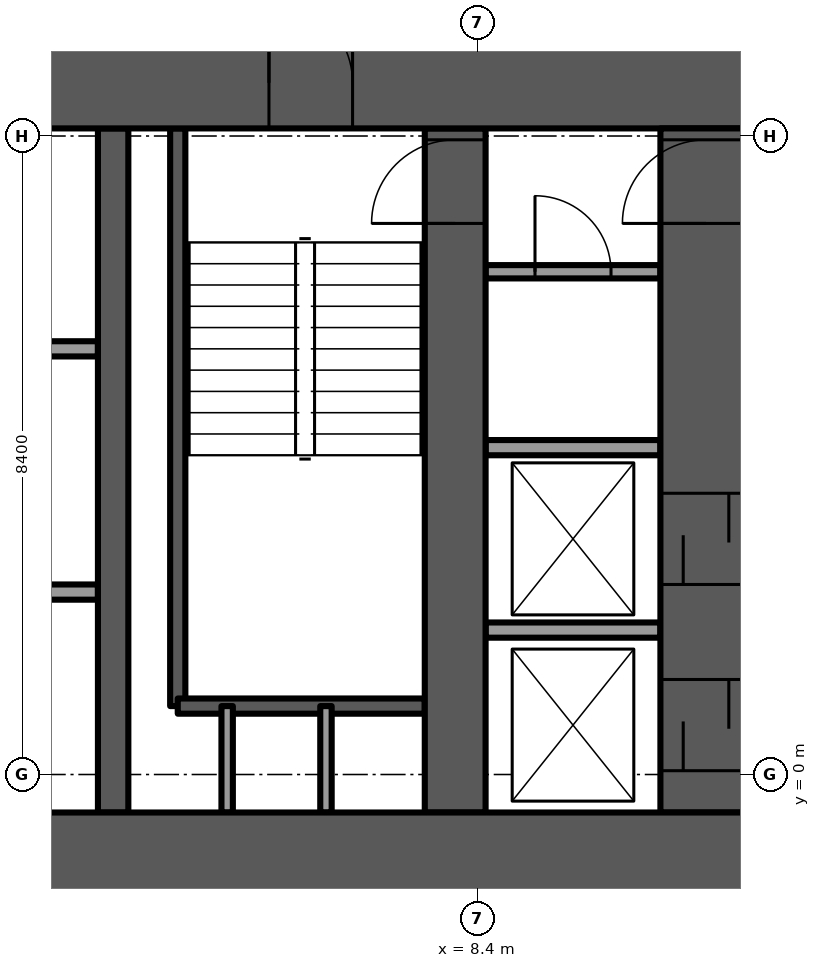
"""IFC4 building model, lengths in metres.
Left out: names, types, materials, properties, quantities, classifications, styles, units other than length and angle.
Written with IfcOpenShell. Run it as: python <this file> out.ifc"""

import sys

from ifc_helpers import new_model, si_unit, direction, frame, frame_2d, origin, place, context, subcontext, project, spatial, rectangle, extrude, element, fill, save


model = new_model("IFC4")
c1 = context("Model", 3, precision=1e-05, world=origin(), true_north=direction((0.0, 1.0)))
c2 = subcontext(c1, "Body", "Model", "MODEL_VIEW")
j1 = project(units=[si_unit("LENGTHUNIT", "METRE"), si_unit("PLANEANGLEUNIT", "RADIAN")], contexts=[c1])
p1 = place(None, origin())
s1 = spatial("IfcSite", under=j1, at=p1, CompositionType="ELEMENT")
p2 = place(p1, origin())
s2 = spatial("IfcBuilding", under=s1, at=p2, CompositionType="ELEMENT")
p3 = place(p2, frame((0.0, 0.0, 39.25)))
s3 = spatial("IfcBuildingStorey", under=s2, at=p3, CompositionType="ELEMENT", Elevation=39.25)
p4 = place(p3, frame((-12.0, -1.1, -0.3), z_axis=(0.0, 0.0, 1.0), x_axis=(1.0, 0.0, 0.0)))
e1 = element("IfcWall", 1, at=p4, inside=s3, PredefinedType="SHEAR", context=c2, shape_type="SweptSolid", body=[
    extrude(rectangle(XDim=24.0, YDim=1.2, at=frame_2d((12.0, 0.0))), origin(), (0.0, 0.0, 1.0), 3.75),
])
p5 = place(p4, frame((11.2, 0.0, 0.0)))
e2 = element("IfcOpeningElement", 2, at=p5, cuts=e1, PredefinedType="OPENING", context=c2, shape_type="SweptSolid", body=[
    extrude(rectangle(XDim=1.6, YDim=2.1, at=frame_2d((0.8, 1.05))), frame((0.0, 0.6, 0.0), z_axis=(0.0, -1.0, 0.0), x_axis=(1.0, 0.0, 0.0)), (0.0, 0.0, 1.0), 1.2),
])
p6 = place(p3, frame((-12.0, 9.1, -0.3), z_axis=(0.0, 0.0, 1.0), x_axis=(1.0, 0.0, 0.0)))
e3 = element("IfcWall", 3, at=p6, inside=s3, PredefinedType="SHEAR", context=c2, shape_type="SweptSolid", body=[
    extrude(rectangle(XDim=24.0, YDim=1.2, at=frame_2d((12.0, 0.0))), origin(), (0.0, 0.0, 1.0), 3.75),
])
p7 = place(p6, frame((11.2, 0.0, 0.0)))
e4 = element("IfcOpeningElement", 4, at=p7, cuts=e3, PredefinedType="OPENING", context=c2, shape_type="SweptSolid", body=[
    extrude(rectangle(XDim=1.6, YDim=2.1, at=frame_2d((0.8, 1.05))), frame((0.0, 0.6, 0.0), z_axis=(0.0, -1.0, 0.0), x_axis=(1.0, 0.0, 0.0)), (0.0, 0.0, 1.0), 1.2),
])
p8 = place(p6, frame((5.25, 0.0, 0.0)))
e5 = element("IfcOpeningElement", 5, at=p8, cuts=e3, PredefinedType="OPENING", context=c2, shape_type="SweptSolid", body=[
    extrude(rectangle(XDim=1.1, YDim=2.1, at=frame_2d((0.55, 1.05))), frame((0.0, 0.6, 0.0), z_axis=(0.0, -1.0, 0.0), x_axis=(1.0, 0.0, 0.0)), (0.0, 0.0, 1.0), 1.2),
])
p9 = place(p6, frame((17.65, 0.0, 0.0)))
e6 = element("IfcOpeningElement", 6, at=p9, cuts=e3, PredefinedType="OPENING", context=c2, shape_type="SweptSolid", body=[
    extrude(rectangle(XDim=1.1, YDim=2.1, at=frame_2d((0.55, 1.05))), frame((0.0, 0.6, 0.0), z_axis=(0.0, -1.0, 0.0), x_axis=(1.0, 0.0, 0.0)), (0.0, 0.0, 1.0), 1.2),
])
p10 = place(p3, frame((8.1, -0.5, -0.3), z_axis=(0.0, 0.0, 1.0), x_axis=(0.0, 1.0, 0.0)))
e7 = element("IfcWall", 7, at=p10, inside=s3, PredefinedType="SHEAR", context=c2, shape_type="SweptSolid", body=[
    extrude(rectangle(XDim=9.0, YDim=0.8, at=frame_2d((4.5, 0.0))), origin(), (0.0, 0.0, 1.0), 3.75),
])
p11 = place(p10, frame((7.75, 0.0, 0.0)))
e8 = element("IfcOpeningElement", 8, at=p11, cuts=e7, PredefinedType="OPENING", context=c2, shape_type="SweptSolid", body=[
    extrude(rectangle(XDim=1.1, YDim=2.1, at=frame_2d((0.55, 1.05))), frame((0.0, 0.4, 0.0), z_axis=(0.0, -1.0, 0.0), x_axis=(1.0, 0.0, 0.0)), (0.0, 0.0, 1.0), 0.8),
])
p12 = place(p3, frame((3.6, -0.5, -0.3), z_axis=(0.0, 0.0, 1.0), x_axis=(0.0, 1.0, 0.0)))
e9 = element("IfcWall", 9, at=p12, inside=s3, PredefinedType="SHEAR", context=c2, shape_type="SweptSolid", body=[
    extrude(rectangle(XDim=9.0, YDim=0.4, at=frame_2d((4.5, 0.0))), origin(), (0.0, 0.0, 1.0), 3.75),
])
p13 = place(p3, frame((11.4, -0.5, -0.3), z_axis=(0.0, 0.0, 1.0), x_axis=(0.0, 1.0, 0.0)))
e10 = element("IfcWall", 10, at=p13, inside=s3, PredefinedType="SHEAR", context=c2, shape_type="SweptSolid", body=[
    extrude(rectangle(XDim=9.0, YDim=1.2, at=frame_2d((4.5, 0.0))), origin(), (0.0, 0.0, 1.0), 3.75),
])
p14 = place(p13, frame((7.75, 0.0, 0.0)))
e11 = element("IfcOpeningElement", 11, at=p14, cuts=e10, PredefinedType="OPENING", context=c2, shape_type="SweptSolid", body=[
    extrude(rectangle(XDim=1.1, YDim=2.1, at=frame_2d((0.55, 1.05))), frame((0.0, 0.6, 0.0), z_axis=(0.0, -1.0, 0.0), x_axis=(1.0, 0.0, 0.0)), (0.0, 0.0, 1.0), 1.2),
])
p15 = place(p13, frame((0.55, 0.0, 0.0)))
e12 = element("IfcOpeningElement", 12, at=p15, cuts=e10, PredefinedType="OPENING", context=c2, shape_type="SweptSolid", body=[
    extrude(rectangle(XDim=1.2, YDim=2.1, at=frame_2d((0.6, 1.05))), frame((0.0, 0.6, 0.0), z_axis=(0.0, -1.0, 0.0), x_axis=(1.0, 0.0, 0.0)), (0.0, 0.0, 1.0), 1.2),
])
p16 = place(p13, frame((3.0, 0.0, 0.0)))
e13 = element("IfcOpeningElement", 13, at=p16, cuts=e10, PredefinedType="OPENING", context=c2, shape_type="SweptSolid", body=[
    extrude(rectangle(XDim=1.2, YDim=2.1, at=frame_2d((0.6, 1.05))), frame((0.0, 0.6, 0.0), z_axis=(0.0, -1.0, 0.0), x_axis=(1.0, 0.0, 0.0)), (0.0, 0.0, 1.0), 1.2),
])
p17 = place(p3, frame((11.087, -17.647, 0.0), z_axis=(0.0, 0.0, 1.0), x_axis=(0.499999841607, 0.866025495233, 0.0)))
e14 = element("IfcWall", 14, at=p17, inside=s3, PredefinedType="SOLIDWALL", context=c2, shape_type="SweptSolid", body=[
    extrude(rectangle(XDim=19.479, YDim=0.15, at=frame_2d((9.739, 0.0))), origin(), (0.0, 0.0, 1.0), 3.45),
])
p18 = place(p17, frame((1.639, 0.0, 0.15)))
e15 = element("IfcOpeningElement", 15, at=p18, cuts=e14, PredefinedType="OPENING", context=c2, shape_type="SweptSolid", body=[
    extrude(rectangle(XDim=1.8, YDim=2.85, at=frame_2d((0.9, 1.425))), frame((0.0, 0.075, 0.0), z_axis=(0.0, -1.0, 0.0), x_axis=(1.0, 0.0, 0.0)), (0.0, 0.0, 1.0), 0.15),
])
p19 = place(p17, frame((3.739, 0.0, 0.0)))
e16 = element("IfcOpeningElement", 16, at=p19, cuts=e14, PredefinedType="OPENING", context=c2, shape_type="SweptSolid", body=[
    extrude(rectangle(XDim=1.5, YDim=2.4, at=frame_2d((0.75, 1.2))), frame((0.0, 0.075, 0.0), z_axis=(0.0, -1.0, 0.0), x_axis=(1.0, 0.0, 0.0)), (0.0, 0.0, 1.0), 0.15),
])
p20 = place(p17, frame((5.839, 0.0, 0.15)))
e17 = element("IfcOpeningElement", 17, at=p20, cuts=e14, PredefinedType="OPENING", context=c2, shape_type="SweptSolid", body=[
    extrude(rectangle(XDim=1.8, YDim=2.85, at=frame_2d((0.9, 1.425))), frame((0.0, 0.075, 0.0), z_axis=(0.0, -1.0, 0.0), x_axis=(1.0, 0.0, 0.0)), (0.0, 0.0, 1.0), 0.15),
])
p21 = place(p17, frame((7.939, 0.0, 0.0)))
e18 = element("IfcOpeningElement", 18, at=p21, cuts=e14, PredefinedType="OPENING", context=c2, shape_type="SweptSolid", body=[
    extrude(rectangle(XDim=1.5, YDim=2.4, at=frame_2d((0.75, 1.2))), frame((0.0, 0.075, 0.0), z_axis=(0.0, -1.0, 0.0), x_axis=(1.0, 0.0, 0.0)), (0.0, 0.0, 1.0), 0.15),
])
p22 = place(p17, frame((10.039, 0.0, 0.15)))
e19 = element("IfcOpeningElement", 19, at=p22, cuts=e14, PredefinedType="OPENING", context=c2, shape_type="SweptSolid", body=[
    extrude(rectangle(XDim=1.8, YDim=2.85, at=frame_2d((0.9, 1.425))), frame((0.0, 0.075, 0.0), z_axis=(0.0, -1.0, 0.0), x_axis=(1.0, 0.0, 0.0)), (0.0, 0.0, 1.0), 0.15),
])
p23 = place(p17, frame((12.139, 0.0, 0.0)))
e20 = element("IfcOpeningElement", 20, at=p23, cuts=e14, PredefinedType="OPENING", context=c2, shape_type="SweptSolid", body=[
    extrude(rectangle(XDim=1.5, YDim=2.4, at=frame_2d((0.75, 1.2))), frame((0.0, 0.075, 0.0), z_axis=(0.0, -1.0, 0.0), x_axis=(1.0, 0.0, 0.0)), (0.0, 0.0, 1.0), 0.15),
])
p24 = place(p17, frame((14.239, 0.0, 0.15)))
e21 = element("IfcOpeningElement", 21, at=p24, cuts=e14, PredefinedType="OPENING", context=c2, shape_type="SweptSolid", body=[
    extrude(rectangle(XDim=0.9, YDim=2.85, at=frame_2d((0.45, 1.425))), frame((0.0, 0.075, 0.0), z_axis=(0.0, -1.0, 0.0), x_axis=(1.0, 0.0, 0.0)), (0.0, 0.0, 1.0), 0.15),
])
p25 = place(p3, frame((20.826, 0.287, 0.0), z_axis=(0.0, 0.0, 1.0), x_axis=(-0.500006057782, 0.866021906294, 0.0)))
e22 = element("IfcWall", 22, at=p25, inside=s3, PredefinedType="SOLIDWALL", context=c2, shape_type="SweptSolid", body=[
    extrude(rectangle(XDim=23.1, YDim=0.15, at=frame_2d((11.55, 0.0))), origin(), (0.0, 0.0, 1.0), 3.45),
])
p26 = place(p25, frame((4.165, 0.0, 0.15)))
e23 = element("IfcOpeningElement", 23, at=p26, cuts=e22, PredefinedType="OPENING", context=c2, shape_type="SweptSolid", body=[
    extrude(rectangle(XDim=0.9, YDim=2.85, at=frame_2d((0.45, 1.425))), frame((0.0, 0.075, 0.0), z_axis=(0.0, -1.0, 0.0), x_axis=(1.0, 0.0, 0.0)), (0.0, 0.0, 1.0), 0.15),
])
p27 = place(p25, frame((5.645, 0.0, 0.15)))
e24 = element("IfcOpeningElement", 24, at=p27, cuts=e22, PredefinedType="OPENING", context=c2, shape_type="SweptSolid", body=[
    extrude(rectangle(XDim=1.5, YDim=2.85, at=frame_2d((0.75, 1.425))), frame((0.0, 0.075, 0.0), z_axis=(0.0, -1.0, 0.0), x_axis=(1.0, 0.0, 0.0)), (0.0, 0.0, 1.0), 0.15),
])
p28 = place(p25, frame((8.365, 0.0, 0.15)))
e25 = element("IfcOpeningElement", 25, at=p28, cuts=e22, PredefinedType="OPENING", context=c2, shape_type="SweptSolid", body=[
    extrude(rectangle(XDim=1.8, YDim=2.85, at=frame_2d((0.9, 1.425))), frame((0.0, 0.075, 0.0), z_axis=(0.0, -1.0, 0.0), x_axis=(1.0, 0.0, 0.0)), (0.0, 0.0, 1.0), 0.15),
])
p29 = place(p25, frame((10.465, 0.0, 0.15)))
e26 = element("IfcOpeningElement", 26, at=p29, cuts=e22, PredefinedType="OPENING", context=c2, shape_type="SweptSolid", body=[
    extrude(rectangle(XDim=1.5, YDim=2.85, at=frame_2d((0.75, 1.425))), frame((0.0, 0.075, 0.0), z_axis=(0.0, -1.0, 0.0), x_axis=(1.0, 0.0, 0.0)), (0.0, 0.0, 1.0), 0.15),
])
p30 = place(p25, frame((12.564, 0.0, 0.15)))
e27 = element("IfcOpeningElement", 27, at=p30, cuts=e22, PredefinedType="OPENING", context=c2, shape_type="SweptSolid", body=[
    extrude(rectangle(XDim=0.9, YDim=2.85, at=frame_2d((0.45, 1.425))), frame((0.0, 0.075, 0.0), z_axis=(0.0, -1.0, 0.0), x_axis=(1.0, 0.0, 0.0)), (0.0, 0.0, 1.0), 0.15),
])
p31 = place(p25, frame((14.665, 0.0, 0.15)))
e28 = element("IfcOpeningElement", 28, at=p31, cuts=e22, PredefinedType="OPENING", context=c2, shape_type="SweptSolid", body=[
    extrude(rectangle(XDim=1.5, YDim=2.85, at=frame_2d((0.75, 1.425))), frame((0.0, 0.075, 0.0), z_axis=(0.0, -1.0, 0.0), x_axis=(1.0, 0.0, 0.0)), (0.0, 0.0, 1.0), 0.15),
])
p32 = place(p25, frame((17.775, 0.0, 0.15)))
e29 = element("IfcOpeningElement", 29, at=p32, cuts=e22, PredefinedType="OPENING", context=c2, shape_type="SweptSolid", body=[
    extrude(rectangle(XDim=0.9, YDim=2.85, at=frame_2d((0.45, 1.425))), frame((0.0, 0.075, 0.0), z_axis=(0.0, -1.0, 0.0), x_axis=(1.0, 0.0, 0.0)), (0.0, 0.0, 1.0), 0.15),
])
p33 = place(p25, frame((18.865, 0.0, 0.0)))
e30 = element("IfcOpeningElement", 30, at=p33, cuts=e22, PredefinedType="OPENING", context=c2, shape_type="SweptSolid", body=[
    extrude(rectangle(XDim=1.5, YDim=2.4, at=frame_2d((0.75, 1.2))), frame((0.0, 0.075, 0.0), z_axis=(0.0, -1.0, 0.0), x_axis=(1.0, 0.0, 0.0)), (0.0, 0.0, 1.0), 0.15),
])
p34 = place(p25, frame((0.322, 0.0, 0.15)))
e31 = element("IfcOpeningElement", 31, at=p34, cuts=e22, PredefinedType="OPENING", context=c2, shape_type="SweptSolid", body=[
    extrude(rectangle(XDim=1.8, YDim=2.73, at=frame_2d((0.9, 1.365))), frame((0.0, 0.075, 0.0), z_axis=(0.0, -1.0, 0.0), x_axis=(1.0, 0.0, 0.0)), (0.0, 0.0, 1.0), 0.15),
])
p35 = place(p25, frame((21.032, 0.0, 0.15)))
e32 = element("IfcOpeningElement", 32, at=p35, cuts=e22, PredefinedType="OPENING", context=c2, shape_type="SweptSolid", body=[
    extrude(rectangle(XDim=1.8, YDim=2.73, at=frame_2d((0.9, 1.365))), frame((0.0, 0.075, 0.0), z_axis=(0.0, -1.0, 0.0), x_axis=(1.0, 0.0, 0.0)), (0.0, 0.0, 1.0), 0.15),
])
for number, where, z_axis, x_axis in (
    (33, (1.1, 2.4, 0.0), (0.0, 0.0, 1.0), (1.0, 0.0, 0.0)),
    (34, (1.1, 5.6, 0.0), (0.0, 0.0, 1.0), (1.0, 0.0, 0.0)),
):
    element("IfcWall", number, at=place(p3, frame(where, z_axis=z_axis, x_axis=x_axis)), inside=s3, PredefinedType="PARTITIONING", context=c2, shape_type="SweptSolid", body=[
        extrude(rectangle(XDim=2.3, YDim=0.2, at=frame_2d((1.15, 0.0))), origin(), (0.0, 0.0, 1.0), 3.45),
    ])
p36 = place(p3, frame((4.45, 0.9, -0.3), z_axis=(0.0, 0.0, 1.0), x_axis=(0.0, 1.0, 0.0)))
e35 = element("IfcWall", 35, at=p36, inside=s3, PredefinedType="SOLIDWALL", context=c2, shape_type="SweptSolid", body=[
    extrude(rectangle(XDim=7.6, YDim=0.2, at=frame_2d((3.8, 0.0))), origin(), (0.0, 0.0, 1.0), 3.75),
])
p37 = place(p3, frame((4.45, 0.9, -0.3), z_axis=(0.0, 0.0, 1.0), x_axis=(1.0, 0.0, 0.0)))
e36 = element("IfcWall", 36, at=p37, inside=s3, PredefinedType="SOLIDWALL", context=c2, shape_type="SweptSolid", body=[
    extrude(rectangle(XDim=3.25, YDim=0.2, at=frame_2d((1.625, 0.0))), origin(), (0.0, 0.0, 1.0), 3.75),
])
for number, where, z_axis, x_axis in (
    (37, (5.1, -0.5, 0.0), (0.0, 0.0, 1.0), (0.0, 1.0, 0.0)),
    (38, (6.4, -0.5, 0.0), (0.0, 0.0, 1.0), (0.0, 1.0, 0.0)),
):
    element("IfcWall", number, at=place(p3, frame(where, z_axis=z_axis, x_axis=x_axis)), inside=s3, PredefinedType="PARTITIONING", context=c2, shape_type="SweptSolid", body=[
        extrude(rectangle(XDim=1.4, YDim=0.15, at=frame_2d((0.7, 0.0))), origin(), (0.0, 0.0, 1.0), 3.45),
    ])
for number, where, z_axis, x_axis in (
    (39, (8.5, 1.9, 0.0), (0.0, 0.0, 1.0), (1.0, 0.0, 0.0)),
    (40, (8.5, 4.3, 0.0), (0.0, 0.0, 1.0), (1.0, 0.0, 0.0)),
):
    element("IfcWall", number, at=place(p3, frame(where, z_axis=z_axis, x_axis=x_axis)), inside=s3, PredefinedType="PARTITIONING", context=c2, shape_type="SweptSolid", body=[
        extrude(rectangle(XDim=2.3, YDim=0.2, at=frame_2d((1.15, 0.0))), origin(), (0.0, 0.0, 1.0), 3.45),
    ])
p38 = place(p3, frame((8.5, 6.614, 0.0), z_axis=(0.0, 0.0, 1.0), x_axis=(1.0, 0.0, 0.0)))
e41 = element("IfcWall", 41, at=p38, inside=s3, PredefinedType="PARTITIONING", context=c2, shape_type="SweptSolid", body=[
    extrude(rectangle(XDim=2.3, YDim=0.175, at=frame_2d((1.15, 0.0))), origin(), (0.0, 0.0, 1.0), 3.45),
])
p39 = place(p38, frame((0.65, 0.0, 0.0)))
e42 = element("IfcOpeningElement", 42, at=p39, cuts=e41, PredefinedType="OPENING", context=c2, shape_type="SweptSolid", body=[
    extrude(rectangle(XDim=1.0, YDim=2.1, at=frame_2d((0.5, 1.05))), frame((0.0, 0.087, 0.0), z_axis=(0.0, -1.0, 0.0), x_axis=(1.0, 0.0, 0.0)), (0.0, 0.0, 1.0), 0.175),
])
p40 = place(p9, origin())
e43 = element("IfcDoor", 43, at=p40, inside=s3, OperationType="SINGLE_SWING_RIGHT", PredefinedType="DOOR", context=c2, shape_type="SweptSolid", body=[
    extrude(rectangle(XDim=1.1, YDim=2.1, at=frame_2d((0.55, 1.05))), frame((0.0, 0.025, 0.0), z_axis=(0.0, -1.0, 0.0), x_axis=(1.0, 0.0, 0.0)), (0.0, 0.0, 1.0), 0.05),
])
fill(e6, e43)
p41 = place(p11, origin())
e44 = element("IfcDoor", 44, at=p41, inside=s3, OperationType="SINGLE_SWING_LEFT", PredefinedType="DOOR", context=c2, shape_type="SweptSolid", body=[
    extrude(rectangle(XDim=1.1, YDim=2.1, at=frame_2d((0.55, 1.05))), frame((0.0, 0.025, 0.0), z_axis=(0.0, -1.0, 0.0), x_axis=(1.0, 0.0, 0.0)), (0.0, 0.0, 1.0), 0.05),
])
fill(e8, e44)
p42 = place(p39, origin())
e45 = element("IfcDoor", 45, at=p42, inside=s3, OperationType="SINGLE_SWING_RIGHT", PredefinedType="DOOR", context=c2, shape_type="SweptSolid", body=[
    extrude(rectangle(XDim=1.0, YDim=2.1, at=frame_2d((0.5, 1.05))), frame((0.0, 0.025, 0.0), z_axis=(0.0, -1.0, 0.0), x_axis=(1.0, 0.0, 0.0)), (0.0, 0.0, 1.0), 0.05),
])
fill(e42, e45)
p43 = place(p14, origin())
e46 = element("IfcDoor", 46, at=p43, inside=s3, OperationType="SINGLE_SWING_RIGHT", PredefinedType="DOOR", context=c2, shape_type="SweptSolid", body=[
    extrude(rectangle(XDim=1.1, YDim=2.1, at=frame_2d((0.55, 1.05))), frame((0.0, 0.025, 0.0), z_axis=(0.0, -1.0, 0.0), x_axis=(1.0, 0.0, 0.0)), (0.0, 0.0, 1.0), 0.05),
])
fill(e11, e46)
p44 = place(p15, origin())
e47 = element("IfcDoor", 47, at=p44, inside=s3, OperationType="SLIDING_TO_LEFT", PredefinedType="DOOR", context=c2, shape_type="SweptSolid", body=[
    extrude(rectangle(XDim=1.2, YDim=2.1, at=frame_2d((0.6, 1.05))), frame((0.0, 0.025, 0.0), z_axis=(0.0, -1.0, 0.0), x_axis=(1.0, 0.0, 0.0)), (0.0, 0.0, 1.0), 0.05),
])
fill(e12, e47)
p45 = place(p16, origin())
e48 = element("IfcDoor", 48, at=p45, inside=s3, OperationType="SLIDING_TO_LEFT", PredefinedType="DOOR", context=c2, shape_type="SweptSolid", body=[
    extrude(rectangle(XDim=1.2, YDim=2.1, at=frame_2d((0.6, 1.05))), frame((0.0, 0.025, 0.0), z_axis=(0.0, -1.0, 0.0), x_axis=(1.0, 0.0, 0.0)), (0.0, 0.0, 1.0), 0.05),
])
fill(e13, e48)
save(model, sys.argv[1])
